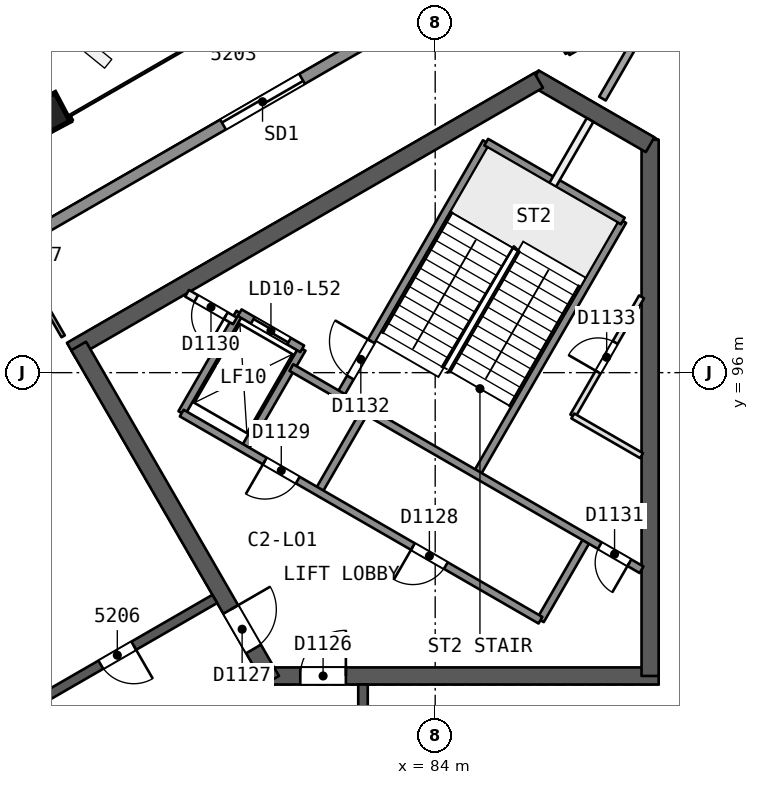
"""IFC4 building model, lengths in metres.
Left out: names, types, materials, properties, quantities, classifications, styles, units other than length and angle.
Written with IfcOpenShell. Run it as: python <this file> out.ifc"""

import sys

from ifc_helpers import new_model, si_unit, direction, frame, frame_2d, origin, origin_2d, place, context, subcontext, project, spatial, rectangle, extrude, element, fill, save


model = new_model("IFC4")
c1 = context("Model", 3, precision=1e-05, world=origin(), true_north=direction((0.0, 1.0)))
c2 = subcontext(c1, "Body", "Model", "MODEL_VIEW")
j1 = project(units=[si_unit("LENGTHUNIT", "METRE"), si_unit("PLANEANGLEUNIT", "RADIAN")], contexts=[c1])
p1 = place(None, origin())
s1 = spatial("IfcSite", under=j1, at=p1, CompositionType="ELEMENT")
p2 = place(p1, origin())
s2 = spatial("IfcBuilding", under=s1, at=p2, CompositionType="ELEMENT")
p3 = place(p2, frame((0.0, 0.0, 213.2)))
s3 = spatial("IfcBuildingStorey", under=s2, at=p3, CompositionType="ELEMENT", Elevation=213.2)
p4 = place(p3, frame((79.63, 88.019, 0.0), z_axis=(0.0, 0.0, 1.0), x_axis=(1.0, 0.0, 0.0)))
e1 = element("IfcWall", 1, at=p4, inside=s3, PredefinedType="SHEAR", context=c2, shape_type="SweptSolid", body=[
    extrude(rectangle(XDim=10.25, YDim=0.45, at=frame_2d((5.125, 0.0))), origin(), (0.0, 0.0, 1.0), 3.7),
])
p5 = place(p4, frame((0.82, 0.0, 0.0)))
e2 = element("IfcOpeningElement", 2, at=p5, cuts=e1, PredefinedType="OPENING", context=c2, shape_type="SweptSolid", body=[
    extrude(rectangle(XDim=1.2, YDim=2.1, at=frame_2d((0.6, 1.05))), frame((0.0, 0.235, 0.0), z_axis=(0.0, -1.0, 0.0), x_axis=(1.0, 0.0, 0.0)), (0.0, 0.0, 1.0), 0.471),
])
p6 = place(p3, frame((89.655, 88.019, 0.0), z_axis=(0.0, 0.0, 1.0), x_axis=(0.0, 1.0, 0.0)))
e3 = element("IfcWall", 3, at=p6, inside=s3, PredefinedType="SHEAR", context=c2, shape_type="SweptSolid", body=[
    extrude(rectangle(XDim=14.108, YDim=0.45, at=frame_2d((7.054, 0.0))), origin(), (0.0, 0.0, 1.0), 3.7),
])
p7 = place(p3, frame((89.655, 101.998, 0.0), z_axis=(0.0, 0.0, 1.0), x_axis=(-0.866042179588, 0.49997094233, 0.0)))
e4 = element("IfcWall", 4, at=p7, inside=s3, PredefinedType="SHEAR", context=c2, shape_type="SweptSolid", body=[
    extrude(rectangle(XDim=3.515, YDim=0.45, at=frame_2d((1.758, 0.0))), origin(), (0.0, 0.0, 1.0), 3.7),
])
p8 = place(p3, frame((86.723, 103.69, 0.0), z_axis=(0.0, 0.0, 1.0), x_axis=(-0.866022713978, -0.500004658852, 0.0)))
e5 = element("IfcWall", 5, at=p8, inside=s3, PredefinedType="SHEAR", context=c2, shape_type="SweptSolid", body=[
    extrude(rectangle(XDim=14.203, YDim=0.45, at=frame_2d((7.102, 0.0))), origin(), (0.0, 0.0, 1.0), 3.7),
])
p9 = place(p3, frame((74.617, 96.701, 0.0), z_axis=(0.0, 0.0, 1.0), x_axis=(0.499994385119, -0.866028645513, 0.0)))
e6 = element("IfcWall", 6, at=p9, inside=s3, PredefinedType="SHEAR", context=c2, shape_type="SweptSolid", body=[
    extrude(rectangle(XDim=10.155, YDim=0.45, at=frame_2d((5.077, 0.0))), origin(), (0.0, 0.0, 1.0), 3.7),
])
p10 = place(p9, frame((8.005, 0.0, 0.0)))
e7 = element("IfcOpeningElement", 7, at=p10, cuts=e6, PredefinedType="OPENING", context=c2, shape_type="SweptSolid", body=[
    extrude(rectangle(XDim=1.2, YDim=2.1, at=frame_2d((0.6, 1.05))), frame((0.0, 0.235, 0.0), z_axis=(0.0, -1.0, 0.0), x_axis=(1.0, 0.0, 0.0)), (0.0, 0.0, 1.0), 0.471),
])
p11 = place(p3, frame((82.1, 72.206, 0.0), z_axis=(0.0, 0.0, 1.0), x_axis=(0.0, 1.0, 0.0)))
e8 = element("IfcWall", 8, at=p11, inside=s3, PredefinedType="SHEAR", context=c2, shape_type="SweptSolid", body=[
    extrude(rectangle(XDim=15.588, YDim=0.25, at=frame_2d((7.794, 0.0))), origin(), (0.0, 0.0, 1.0), 3.3),
])
p12 = place(p11, frame((2.618, 0.0, 0.0)))
e9 = element("IfcOpeningElement", 9, at=p12, cuts=e8, PredefinedType="OPENING", context=c2, shape_type="SweptSolid", body=[
    extrude(rectangle(XDim=1.0, YDim=2.1, at=frame_2d((0.5, 1.05))), frame((0.0, 0.135, 0.0), z_axis=(0.0, -1.0, 0.0), x_axis=(1.0, 0.0, 0.0)), (0.0, 0.0, 1.0), 0.271),
])
p13 = place(p11, frame((7.974, 0.0, 0.0)))
e10 = element("IfcOpeningElement", 10, at=p13, cuts=e8, PredefinedType="OPENING", context=c2, shape_type="SweptSolid", body=[
    extrude(rectangle(XDim=1.2, YDim=2.4, at=frame_2d((0.6, 1.2))), frame((0.0, 0.135, 0.0), z_axis=(0.0, -1.0, 0.0), x_axis=(1.0, 0.0, 0.0)), (0.0, 0.0, 1.0), 0.271),
])
p14 = place(p11, frame((12.65, 0.0, 0.0)))
e11 = element("IfcOpeningElement", 11, at=p14, cuts=e8, PredefinedType="OPENING", context=c2, shape_type="SweptSolid", body=[
    extrude(rectangle(XDim=1.2, YDim=2.4, at=frame_2d((0.6, 1.2))), frame((0.0, 0.135, 0.0), z_axis=(0.0, -1.0, 0.0), x_axis=(1.0, 0.0, 0.0)), (0.0, 0.0, 1.0), 0.271),
])
p15 = place(p3, frame((78.2, 90.046, 0.0), z_axis=(0.0, 0.0, 1.0), x_axis=(-0.866026492143, -0.499998114903, 0.0)))
e12 = element("IfcWall", 12, at=p15, inside=s3, PredefinedType="SHEAR", context=c2, shape_type="SweptSolid", body=[
    extrude(rectangle(XDim=15.588, YDim=0.25, at=frame_2d((7.794, 0.0))), origin(), (0.0, 0.0, 1.0), 3.3),
])
p16 = place(p15, frame((2.462, 0.0, 0.0)))
e13 = element("IfcOpeningElement", 13, at=p16, cuts=e12, PredefinedType="OPENING", context=c2, shape_type="SweptSolid", body=[
    extrude(rectangle(XDim=1.0, YDim=2.1, at=frame_2d((0.5, 1.05))), frame((0.0, 0.135, 0.0), z_axis=(0.0, -1.0, 0.0), x_axis=(1.0, 0.0, 0.0)), (0.0, 0.0, 1.0), 0.271),
])
p17 = place(p15, frame((8.003, 0.0, 0.0)))
e14 = element("IfcOpeningElement", 14, at=p17, cuts=e12, PredefinedType="OPENING", context=c2, shape_type="SweptSolid", body=[
    extrude(rectangle(XDim=1.1, YDim=2.1, at=frame_2d((0.55, 1.05))), frame((0.0, 0.135, 0.0), z_axis=(0.0, -1.0, 0.0), x_axis=(1.0, 0.0, 0.0)), (0.0, 0.0, 1.0), 0.271),
])
p18 = place(p15, frame((11.971, 0.0, 0.0)))
e15 = element("IfcOpeningElement", 15, at=p18, cuts=e12, PredefinedType="OPENING", context=c2, shape_type="SweptSolid", body=[
    extrude(rectangle(XDim=1.0, YDim=2.1, at=frame_2d((0.5, 1.05))), frame((0.0, 0.135, 0.0), z_axis=(0.0, -1.0, 0.0), x_axis=(1.0, 0.0, 0.0)), (0.0, 0.0, 1.0), 0.271),
])
p19 = place(p3, frame((73.819, 102.818, 0.0), z_axis=(0.000857580205, -0.022758859284, 0.9997406158), x_axis=(0.86599968756, 0.499931370183, 0.010637962836)))
e16 = element("IfcColumn", 16, at=p19, inside=s3, PredefinedType="COLUMN", context=c2, shape_type="SweptSolid", body=[
    extrude(rectangle(XDim=0.85, YDim=0.85, at=origin_2d()), origin(), (0.0, 0.0, 1.0), 3.701),
])
p20 = place(p3, frame((90.459, 106.776, 0.0), z_axis=(0.0, 0.0, 1.0), x_axis=(-0.499979154163, -0.8660374388, 0.0)))
e17 = element("IfcWall", 17, at=p20, inside=s3, PredefinedType="PARTITIONING", context=c2, shape_type="SweptSolid", body=[
    extrude(rectangle(XDim=4.116, YDim=0.2, at=frame_2d((2.058, 0.0))), origin(), (0.0, 0.0, 1.0), 3.3),
])
p21 = place(p3, frame((74.21, 96.956, 0.0), z_axis=(0.0, 0.0, 1.0), x_axis=(-0.49995513091, 0.866051307416, 0.0)))
e18 = element("IfcWall", 18, at=p21, inside=s3, PredefinedType="PARTITIONING", context=c2, shape_type="SweptSolid", body=[
    extrude(rectangle(XDim=2.573, YDim=0.1, at=frame_2d((1.287, 0.0))), origin(), (0.0, 0.0, 1.0), 3.3),
])
p22 = place(p21, frame((0.837, 0.0, 0.0)))
e19 = element("IfcOpeningElement", 19, at=p22, cuts=e18, PredefinedType="OPENING", context=c2, shape_type="SweptSolid", body=[
    extrude(rectangle(XDim=0.9, YDim=2.1, at=frame_2d((0.45, 1.05))), frame((0.0, 0.061, 0.0), z_axis=(0.0, -1.0, 0.0), x_axis=(1.0, 0.0, 0.0)), (0.0, 0.0, 1.0), 0.121),
])
p23 = place(p3, frame((89.75, 105.723, 0.0), z_axis=(0.0, 0.0, 1.0), x_axis=(-0.866021400173, -0.500006934395, 0.0)))
e20 = element("IfcWall", 20, at=p23, inside=s3, PredefinedType="PARTITIONING", context=c2, shape_type="SweptSolid", body=[
    extrude(rectangle(XDim=2.6, YDim=0.15, at=frame_2d((1.3, 0.0))), origin(), (0.0, 0.0, 1.0), 3.3),
])
p24 = place(p3, frame((87.498, 104.423, 0.0), z_axis=(0.0, 0.0, 1.0), x_axis=(-0.499947816978, 0.86605552957, 0.0)))
e21 = element("IfcWall", 21, at=p24, inside=s3, PredefinedType="PARTITIONING", context=c2, shape_type="SweptSolid", body=[
    extrude(rectangle(XDim=2.751, YDim=0.15, at=frame_2d((1.375, 0.0))), origin(), (0.0, 0.0, 1.0), 3.3),
])
p25 = place(p24, frame((0.975, 0.0, 0.0)))
e22 = element("IfcOpeningElement", 22, at=p25, cuts=e21, PredefinedType="OPENING", context=c2, shape_type="SweptSolid", body=[
    extrude(rectangle(XDim=0.8, YDim=2.1, at=frame_2d((0.4, 1.05))), frame((0.0, 0.085, 0.0), z_axis=(0.0, -1.0, 0.0), x_axis=(1.0, 0.0, 0.0)), (0.0, 0.0, 1.0), 0.171),
])
p26 = place(p3, frame((43.933, 82.619, 0.0), z_axis=(0.0, 0.0, 1.0), x_axis=(0.866026349667, 0.49999836168, 0.0)))
e23 = element("IfcWall", 23, at=p26, inside=s3, PredefinedType="SOLIDWALL", context=c2, shape_type="SweptSolid", body=[
    extrude(rectangle(XDim=51.192, YDim=0.3, at=frame_2d((25.596, 0.0))), origin(), (0.0, 0.0, 1.0), 3.3),
])
p27 = place(p26, frame((24.552, 0.0, 0.0)))
e24 = element("IfcOpeningElement", 24, at=p27, cuts=e23, PredefinedType="OPENING", context=c2, shape_type="SweptSolid", body=[
    extrude(rectangle(XDim=2.4, YDim=2.4, at=frame_2d((1.2, 1.2))), frame((0.0, 0.161, 0.0), z_axis=(0.0, -1.0, 0.0), x_axis=(1.0, 0.0, 0.0)), (0.0, 0.0, 1.0), 0.321),
])
p28 = place(p26, frame((29.228, 0.0, 0.0)))
e25 = element("IfcOpeningElement", 25, at=p28, cuts=e23, PredefinedType="OPENING", context=c2, shape_type="SweptSolid", body=[
    extrude(rectangle(XDim=2.4, YDim=2.4, at=frame_2d((1.2, 1.2))), frame((0.0, 0.161, 0.0), z_axis=(0.0, -1.0, 0.0), x_axis=(1.0, 0.0, 0.0)), (0.0, 0.0, 1.0), 0.321),
])
p29 = place(p26, frame((39.819, 0.0, 0.0)))
e26 = element("IfcOpeningElement", 26, at=p29, cuts=e23, PredefinedType="OPENING", context=c2, shape_type="SweptSolid", body=[
    extrude(rectangle(XDim=2.4, YDim=2.4, at=frame_2d((1.2, 1.2))), frame((0.0, 0.161, 0.0), z_axis=(0.0, -1.0, 0.0), x_axis=(1.0, 0.0, 0.0)), (0.0, 0.0, 1.0), 0.321),
])
p30 = place(p26, frame((19.719, 0.0, 0.0)))
e27 = element("IfcOpeningElement", 27, at=p30, cuts=e23, PredefinedType="OPENING", context=c2, shape_type="SweptSolid", body=[
    extrude(rectangle(XDim=2.4, YDim=2.4, at=frame_2d((1.2, 1.2))), frame((0.0, 0.161, 0.0), z_axis=(0.0, -1.0, 0.0), x_axis=(1.0, 0.0, 0.0)), (0.0, 0.0, 1.0), 0.321),
])
p31 = place(p26, frame((8.993, 0.0, 0.0)))
e28 = element("IfcOpeningElement", 28, at=p31, cuts=e23, PredefinedType="OPENING", context=c2, shape_type="SweptSolid", body=[
    extrude(rectangle(XDim=2.4, YDim=2.4, at=frame_2d((1.2, 1.2))), frame((0.0, 0.161, 0.0), z_axis=(0.0, -1.0, 0.0), x_axis=(1.0, 0.0, 0.0)), (0.0, 0.0, 1.0), 0.321),
])
p32 = place(p3, frame((86.77, 89.486, 0.0), z_axis=(0.0, 0.0, 1.0), x_axis=(0.499961042966, 0.86604789447, 0.0)))
e29 = element("IfcWall", 29, at=p32, inside=s3, PredefinedType="SOLIDWALL", context=c2, shape_type="SweptSolid", body=[
    extrude(rectangle(XDim=2.48, YDim=0.2, at=frame_2d((1.24, 0.0))), origin(), (0.0, 0.0, 1.0), 3.3),
])
p33 = place(p3, frame((87.621, 94.86, 0.0), z_axis=(0.0, 0.0, 1.0), x_axis=(0.499993116331, 0.866029378036, 0.0)))
e30 = element("IfcWall", 30, at=p33, inside=s3, PredefinedType="PARTITIONING", context=c2, shape_type="SweptSolid", body=[
    extrude(rectangle(XDim=3.618, YDim=0.15, at=frame_2d((1.809, 0.0))), origin(), (0.0, 0.0, 1.0), 3.3),
])
p34 = place(p33, frame((1.332, 0.0, 0.0)))
e31 = element("IfcOpeningElement", 31, at=p34, cuts=e30, PredefinedType="OPENING", context=c2, shape_type="SweptSolid", body=[
    extrude(rectangle(XDim=0.9, YDim=2.1, at=frame_2d((0.45, 1.05))), frame((0.0, 0.085, 0.0), z_axis=(0.0, -1.0, 0.0), x_axis=(1.0, 0.0, 0.0)), (0.0, 0.0, 1.0), 0.171),
])
p35 = place(p3, frame((85.087, 93.321, 0.0), z_axis=(0.0, 0.0, 1.0), x_axis=(0.500019787375, 0.866013979237, 0.0)))
e32 = element("IfcWall", 32, at=p35, inside=s3, PredefinedType="SOLIDWALL", context=c2, shape_type="SweptSolid", body=[
    extrude(rectangle(XDim=7.7, YDim=0.2, at=frame_2d((3.85, 0.0))), origin(), (0.0, 0.0, 1.0), 3.3),
])
p36 = place(p3, frame((87.09, 100.94, 0.0), z_axis=(0.0, 0.0, 1.0), x_axis=(0.500011643316, 0.866018681408, 0.0)))
e33 = element("IfcWall", 33, at=p36, inside=s3, PredefinedType="PARTITIONING", context=c2, shape_type="SweptSolid", body=[
    extrude(rectangle(XDim=1.973, YDim=0.2, at=frame_2d((0.987, 0.0))), origin(), (0.0, 0.0, 1.0), 3.3),
])
p37 = place(p3, frame((80.924, 92.861, 0.0), z_axis=(0.0, 0.0, 1.0), x_axis=(0.499961042966, 0.86604789447, 0.0)))
e34 = element("IfcWall", 34, at=p37, inside=s3, PredefinedType="SOLIDWALL", context=c2, shape_type="SweptSolid", body=[
    extrude(rectangle(XDim=2.48, YDim=0.2, at=frame_2d((1.24, 0.0))), origin(), (0.0, 0.0, 1.0), 3.3),
])
p38 = place(p3, frame((81.493, 95.396, 0.0), z_axis=(0.0, 0.0, 1.0), x_axis=(0.500006057782, 0.866021906294, 0.0)))
e35 = element("IfcWall", 35, at=p38, inside=s3, PredefinedType="SOLIDWALL", context=c2, shape_type="SweptSolid", body=[
    extrude(rectangle(XDim=7.7, YDim=0.2, at=frame_2d((3.85, 0.0))), origin(), (0.0, 0.0, 1.0), 3.3),
])
p39 = place(p38, frame((0.55, 0.0, 0.0)))
e36 = element("IfcOpeningElement", 36, at=p39, cuts=e35, PredefinedType="OPENING", context=c2, shape_type="SweptSolid", body=[
    extrude(rectangle(XDim=1.1, YDim=2.1, at=frame_2d((0.55, 1.05))), frame((0.0, 0.11, 0.0), z_axis=(0.0, -1.0, 0.0), x_axis=(1.0, 0.0, 0.0)), (0.0, 0.0, 1.0), 0.221),
])
for number, where, z_axis, x_axis in (
    (37, (78.976, 93.986, 0.0), (0.0, 0.0, 1.0), (0.5, 0.866, 0.0)),
    (38, (77.33, 94.936, 0.0), (0.0, 0.0, 1.0), (0.5, 0.866, 0.0)),
):
    element("IfcWall", number, at=place(p3, frame(where, z_axis=z_axis, x_axis=x_axis)), inside=s3, PredefinedType="SOLIDWALL", context=c2, shape_type="SweptSolid", body=[
        extrude(rectangle(XDim=3.05, YDim=0.2, at=frame_2d((1.525, 0.0))), origin(), (0.0, 0.0, 1.0), 3.3),
    ])
p40 = place(p3, frame((86.77, 89.486, 0.0), z_axis=(0.0, 0.0, 1.0), x_axis=(-0.86601811187, 0.500012629753, 0.0)))
e39 = element("IfcWall", 39, at=p40, inside=s3, PredefinedType="SOLIDWALL", context=c2, shape_type="SweptSolid", body=[
    extrude(rectangle(XDim=10.9, YDim=0.2, at=frame_2d((5.45, 0.0))), origin(), (0.0, 0.0, 1.0), 3.3),
])
p41 = place(p40, frame((2.875, 0.0, 0.0)))
e40 = element("IfcOpeningElement", 40, at=p41, cuts=e39, PredefinedType="OPENING", context=c2, shape_type="SweptSolid", body=[
    extrude(rectangle(XDim=1.0, YDim=2.1, at=frame_2d((0.5, 1.05))), frame((0.0, 0.11, 0.0), z_axis=(0.0, -1.0, 0.0), x_axis=(1.0, 0.0, 0.0)), (0.0, 0.0, 1.0), 0.221),
])
p42 = place(p40, frame((7.375, 0.0, 0.0)))
e41 = element("IfcOpeningElement", 41, at=p42, cuts=e39, PredefinedType="OPENING", context=c2, shape_type="SweptSolid", body=[
    extrude(rectangle(XDim=1.0, YDim=2.1, at=frame_2d((0.5, 1.05))), frame((0.0, 0.11, 0.0), z_axis=(0.0, -1.0, 0.0), x_axis=(1.0, 0.0, 0.0)), (0.0, 0.0, 1.0), 0.221),
])
p43 = place(p3, frame((89.43, 90.814, 0.0), z_axis=(0.0, 0.0, 1.0), x_axis=(-0.866018983788, 0.500011119594, 0.0)))
e42 = element("IfcWall", 42, at=p43, inside=s3, PredefinedType="SOLIDWALL", context=c2, shape_type="SweptSolid", body=[
    extrude(rectangle(XDim=10.64, YDim=0.2, at=frame_2d((5.32, 0.0))), origin(), (0.0, 0.0, 1.0), 3.3),
])
p44 = place(p43, frame((0.37, 0.0, 0.0)))
e43 = element("IfcOpeningElement", 43, at=p44, cuts=e42, PredefinedType="OPENING", context=c2, shape_type="SweptSolid", body=[
    extrude(rectangle(XDim=0.9, YDim=2.1, at=frame_2d((0.45, 1.05))), frame((0.0, 0.11, 0.0), z_axis=(0.0, -1.0, 0.0), x_axis=(1.0, 0.0, 0.0)), (0.0, 0.0, 1.0), 0.221),
])
p45 = place(p3, frame((78.73, 97.361, 0.0), z_axis=(0.0, 0.0, 1.0), x_axis=(-0.866045896294, 0.499964504253, 0.0)))
e44 = element("IfcWall", 44, at=p45, inside=s3, PredefinedType="PARTITIONING", context=c2, shape_type="SweptSolid", body=[
    extrude(rectangle(XDim=1.455, YDim=0.2, at=frame_2d((0.728, 0.0))), origin(), (0.0, 0.0, 1.0), 3.3),
])
p46 = place(p45, frame((0.278, 0.0, 0.0)))
e45 = element("IfcOpeningElement", 45, at=p46, cuts=e44, PredefinedType="OPENING", context=c2, shape_type="SweptSolid", body=[
    extrude(rectangle(XDim=0.9, YDim=2.1, at=frame_2d((0.45, 1.05))), frame((0.0, 0.11, 0.0), z_axis=(0.0, -1.0, 0.0), x_axis=(1.0, 0.0, 0.0)), (0.0, 0.0, 1.0), 0.221),
])
p47 = place(p3, frame((80.5, 96.627, 0.0), z_axis=(0.0, 0.0, 1.0), x_axis=(-0.86601224135, 0.500022797313, 0.0)))
e46 = element("IfcWall", 46, at=p47, inside=s3, PredefinedType="SOLIDWALL", context=c2, shape_type="SweptSolid", body=[
    extrude(rectangle(XDim=1.9, YDim=0.2, at=frame_2d((0.95, 0.0))), origin(), (0.0, 0.0, 1.0), 3.3),
])
p48 = place(p47, frame((0.4, 0.0, 0.0)))
e47 = element("IfcOpeningElement", 47, at=p48, cuts=e46, PredefinedType="OPENING", context=c2, shape_type="SweptSolid", body=[
    extrude(rectangle(XDim=1.1, YDim=2.1, at=frame_2d((0.55, 1.05))), frame((0.0, 0.11, 0.0), z_axis=(0.0, -1.0, 0.0), x_axis=(1.0, 0.0, 0.0)), (0.0, 0.0, 1.0), 0.221),
])
p49 = place(p3, frame((89.43, 93.816, 0.0), z_axis=(0.0, 0.0, 1.0), x_axis=(-0.866004557827, 0.500036104519, 0.0)))
e48 = element("IfcWall", 48, at=p49, inside=s3, PredefinedType="PARTITIONING", context=c2, shape_type="SweptSolid", body=[
    extrude(rectangle(XDim=2.089, YDim=0.15, at=frame_2d((1.044, 0.0))), origin(), (0.0, 0.0, 1.0), 3.3),
])
p50 = place(p3, frame((88.937, 99.99, 0.0), z_axis=(0.0, 0.0, 1.0), x_axis=(-0.866004344652, 0.500036473714, 0.0)))
e49 = element("IfcWall", 49, at=p50, inside=s3, PredefinedType="SOLIDWALL", context=c2, shape_type="SweptSolid", body=[
    extrude(rectangle(XDim=4.15, YDim=0.2, at=frame_2d((2.075, 0.0))), origin(), (0.0, 0.0, 1.0), 3.3),
])
p51 = place(p16, origin())
e50 = element("IfcDoor", 50, at=p51, inside=s3, OperationType="SINGLE_SWING_LEFT", PredefinedType="NOTDEFINED", context=c2, shape_type="SweptSolid", body=[
    extrude(rectangle(XDim=1.0, YDim=2.1, at=frame_2d((0.5, 1.05))), frame((0.0, 0.025, 0.0), z_axis=(0.0, -1.0, 0.0), x_axis=(1.0, 0.0, 0.0)), (0.0, 0.0, 1.0), 0.05),
])
fill(e13, e50)
p52 = place(p29, origin())
e51 = element("IfcDoor", 51, at=p52, inside=s3, OperationType="SLIDING_TO_LEFT", PredefinedType="NOTDEFINED", context=c2, shape_type="SweptSolid", body=[
    extrude(rectangle(XDim=2.4, YDim=2.4, at=frame_2d((1.2, 1.2))), frame((0.0, 0.025, 0.0), z_axis=(0.0, -1.0, 0.0), x_axis=(1.0, 0.0, 0.0)), (0.0, 0.0, 1.0), 0.05),
])
fill(e26, e51)
p53 = place(p5, origin())
e52 = element("IfcDoor", 52, at=p53, inside=s3, OperationType="SINGLE_SWING_RIGHT", PredefinedType="NOTDEFINED", context=c2, shape_type="SweptSolid", body=[
    extrude(rectangle(XDim=1.2, YDim=2.1, at=frame_2d((0.6, 1.05))), frame((0.0, 0.025, 0.0), z_axis=(0.0, -1.0, 0.0), x_axis=(1.0, 0.0, 0.0)), (0.0, 0.0, 1.0), 0.05),
])
fill(e2, e52)
p54 = place(p10, origin())
e53 = element("IfcDoor", 53, at=p54, inside=s3, OperationType="SINGLE_SWING_LEFT", PredefinedType="NOTDEFINED", context=c2, shape_type="SweptSolid", body=[
    extrude(rectangle(XDim=1.2, YDim=2.1, at=frame_2d((0.6, 1.05))), frame((0.0, 0.025, 0.0), z_axis=(0.0, -1.0, 0.0), x_axis=(1.0, 0.0, 0.0)), (0.0, 0.0, 1.0), 0.05),
])
fill(e7, e53)
p55 = place(p48, origin())
e54 = element("IfcDoor", 54, at=p55, inside=s3, OperationType="SLIDING_TO_RIGHT", PredefinedType="NOTDEFINED", context=c2, shape_type="SweptSolid", body=[
    extrude(rectangle(XDim=1.1, YDim=2.1, at=frame_2d((0.55, 1.05))), frame((0.0, 0.025, 0.0), z_axis=(0.0, -1.0, 0.0), x_axis=(1.0, 0.0, 0.0)), (0.0, 0.0, 1.0), 0.05),
])
fill(e47, e54)
p56 = place(p41, origin())
e55 = element("IfcDoor", 55, at=p56, inside=s3, OperationType="SINGLE_SWING_RIGHT", PredefinedType="NOTDEFINED", context=c2, shape_type="SweptSolid", body=[
    extrude(rectangle(XDim=1.0, YDim=2.1, at=frame_2d((0.5, 1.05))), frame((0.0, 0.025, 0.0), z_axis=(0.0, -1.0, 0.0), x_axis=(1.0, 0.0, 0.0)), (0.0, 0.0, 1.0), 0.05),
])
fill(e40, e55)
p57 = place(p42, origin())
e56 = element("IfcDoor", 56, at=p57, inside=s3, OperationType="SINGLE_SWING_RIGHT", PredefinedType="NOTDEFINED", context=c2, shape_type="SweptSolid", body=[
    extrude(rectangle(XDim=1.0, YDim=2.1, at=frame_2d((0.5, 1.05))), frame((0.0, 0.025, 0.0), z_axis=(0.0, -1.0, 0.0), x_axis=(1.0, 0.0, 0.0)), (0.0, 0.0, 1.0), 0.05),
])
fill(e41, e56)
p58 = place(p46, origin())
e57 = element("IfcDoor", 57, at=p58, inside=s3, OperationType="SINGLE_SWING_LEFT", PredefinedType="NOTDEFINED", context=c2, shape_type="SweptSolid", body=[
    extrude(rectangle(XDim=0.9, YDim=2.1, at=frame_2d((0.45, 1.05))), frame((0.0, 0.025, 0.0), z_axis=(0.0, -1.0, 0.0), x_axis=(1.0, 0.0, 0.0)), (0.0, 0.0, 1.0), 0.05),
])
fill(e45, e57)
p59 = place(p44, origin())
e58 = element("IfcDoor", 58, at=p59, inside=s3, OperationType="SINGLE_SWING_LEFT", PredefinedType="NOTDEFINED", context=c2, shape_type="SweptSolid", body=[
    extrude(rectangle(XDim=0.9, YDim=2.1, at=frame_2d((0.45, 1.05))), frame((0.0, 0.025, 0.0), z_axis=(0.0, -1.0, 0.0), x_axis=(1.0, 0.0, 0.0)), (0.0, 0.0, 1.0), 0.05),
])
fill(e43, e58)
p60 = place(p39, origin())
e59 = element("IfcDoor", 59, at=p60, inside=s3, OperationType="SINGLE_SWING_RIGHT", PredefinedType="NOTDEFINED", context=c2, shape_type="SweptSolid", body=[
    extrude(rectangle(XDim=1.1, YDim=2.1, at=frame_2d((0.55, 1.05))), frame((0.0, 0.025, 0.0), z_axis=(0.0, -1.0, 0.0), x_axis=(1.0, 0.0, 0.0)), (0.0, 0.0, 1.0), 0.05),
])
fill(e36, e59)
p61 = place(p34, origin())
e60 = element("IfcDoor", 60, at=p61, inside=s3, OperationType="SINGLE_SWING_LEFT", PredefinedType="NOTDEFINED", context=c2, shape_type="SweptSolid", body=[
    extrude(rectangle(XDim=0.9, YDim=2.1, at=frame_2d((0.45, 1.05))), frame((0.0, 0.025, 0.0), z_axis=(0.0, -1.0, 0.0), x_axis=(1.0, 0.0, 0.0)), (0.0, 0.0, 1.0), 0.05),
])
fill(e31, e60)
save(model, sys.argv[1])
